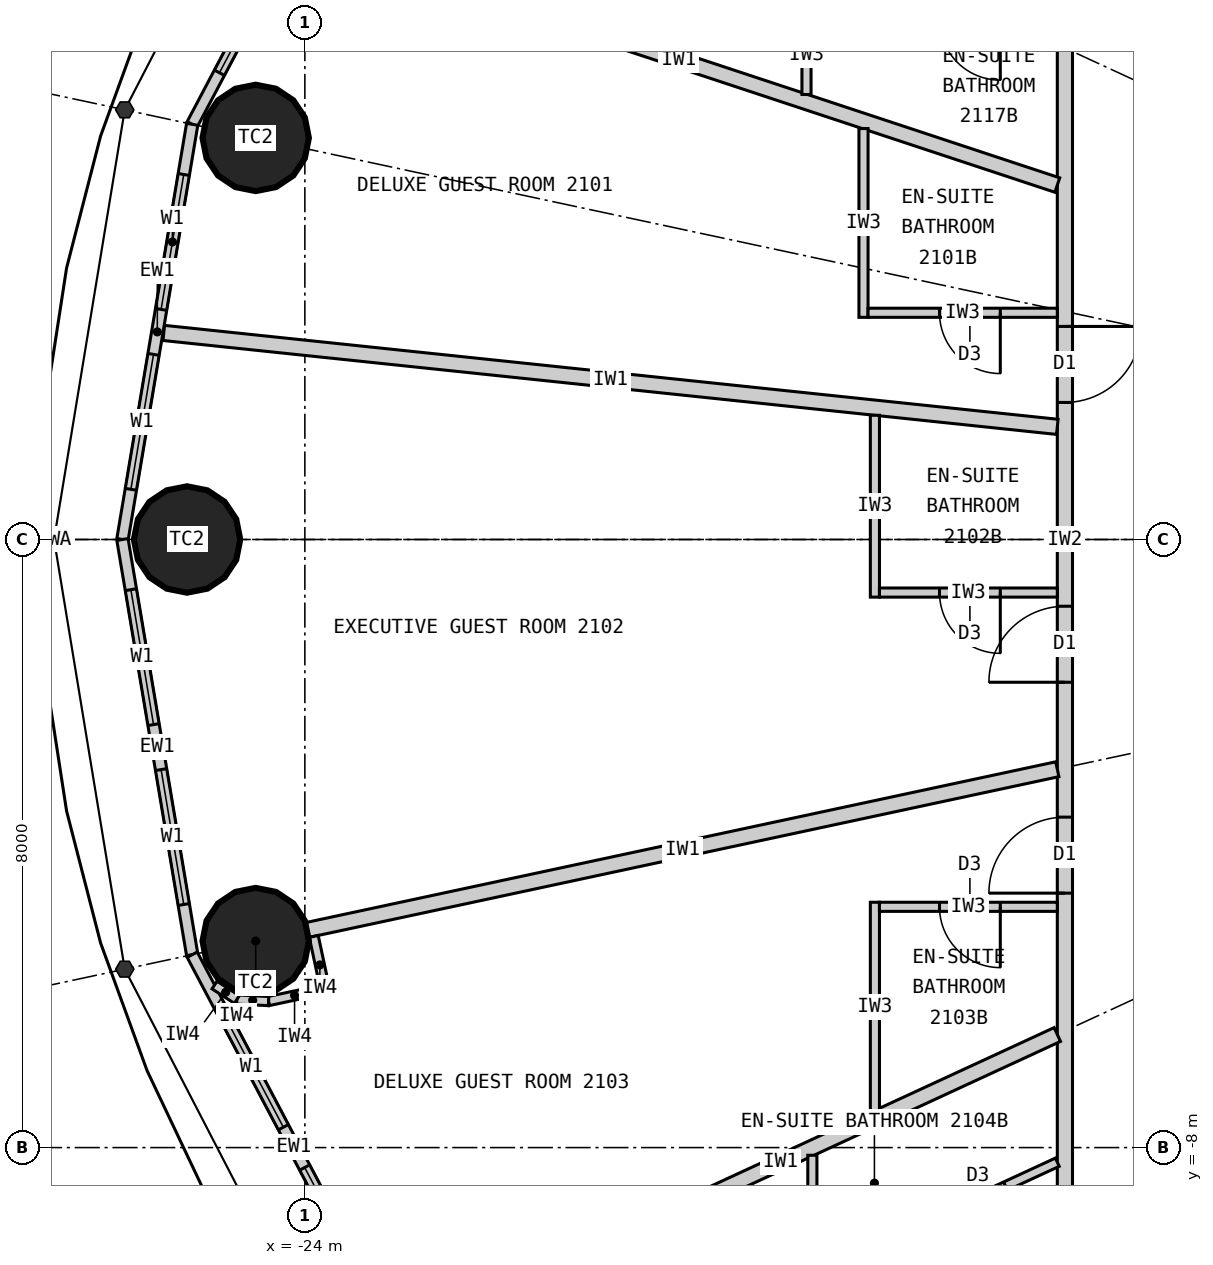
"""IFC4 building model, lengths in metres.
Left out: names, types, materials, properties, quantities, classifications, styles, units other than length and angle.
Written with IfcOpenShell. Run it as: python <this file> out.ifc"""

import sys

from ifc_helpers import new_model, si_unit, direction, frame, frame_2d, origin, origin_2d, place, context, subcontext, project, spatial, rectangle, circle, extrude, element, fill, save


model = new_model("IFC4")
c1 = context("Model", 3, precision=1e-05, world=origin(), true_north=direction((0.0, 1.0)))
c2 = subcontext(c1, "Body", "Model", "MODEL_VIEW")
j1 = project(units=[si_unit("LENGTHUNIT", "METRE"), si_unit("PLANEANGLEUNIT", "RADIAN")], contexts=[c1])
p1 = place(None, origin())
s1 = spatial("IfcSite", under=j1, at=p1, CompositionType="ELEMENT")
p2 = place(p1, origin())
s2 = spatial("IfcBuilding", under=s1, at=p2, CompositionType="ELEMENT")
p3 = place(p2, frame((0.0, 0.0, 83.7)))
s3 = spatial("IfcBuildingStorey", under=s2, at=p3, CompositionType="ELEMENT", Elevation=83.7)
for number, where, z_axis, x_axis in (
    (1, (-24.647, 5.283, 0.0), (0.0, 0.0, 1.0), (1.0, 0.0, 0.0)),
    (2, (-25.55, 0.0, 0.0), (0.0, 0.0, 1.0), (1.0, 0.0, 0.0)),
    (3, (-24.647, -5.283, 0.0), (0.0, 0.0, 1.0), (1.0, 0.0, 0.0)),
):
    element("IfcColumn", number, at=place(p3, frame(where, z_axis=z_axis, x_axis=x_axis)), inside=s3, PredefinedType="COLUMN", context=c2, shape_type="SweptSolid", body=[
        extrude(circle(Radius=0.7, at=origin_2d()), origin(), (0.0, 0.0, 1.0), 3.3),
    ])
p4 = place(p3, frame((-22.803, 10.532, 0.0), z_axis=(0.0, 0.0, 1.0), x_axis=(-0.467296867008, -0.884100468321, 0.0)))
e4 = element("IfcWall", 4, at=p4, inside=s3, PredefinedType="ELEMENTEDWALL", context=c2, shape_type="SweptSolid", body=[
    extrude(rectangle(XDim=5.734, YDim=0.15, at=frame_2d((2.867, 0.0))), origin(), (0.0, 0.0, 1.0), 3.12),
])
p5 = place(p4, frame((0.767, 0.0, 0.9)))
e5 = element("IfcOpeningElement", 5, at=p5, cuts=e4, PredefinedType="OPENING", context=c2, shape_type="SweptSolid", body=[
    extrude(rectangle(XDim=1.8, YDim=1.9, at=frame_2d((0.9, 0.95))), frame((0.0, 0.085, 0.0), z_axis=(0.0, -1.0, 0.0), x_axis=(1.0, 0.0, 0.0)), (0.0, 0.0, 1.0), 0.17),
])
p6 = place(p4, frame((3.167, 0.0, 0.9)))
e6 = element("IfcOpeningElement", 6, at=p6, cuts=e4, PredefinedType="OPENING", context=c2, shape_type="SweptSolid", body=[
    extrude(rectangle(XDim=1.8, YDim=1.9, at=frame_2d((0.9, 0.95))), frame((0.0, 0.085, 0.0), z_axis=(0.0, -1.0, 0.0), x_axis=(1.0, 0.0, 0.0)), (0.0, 0.0, 1.0), 0.17),
])
p7 = place(p3, frame((-25.482, 5.462, 0.0), z_axis=(0.0, 0.0, 1.0), x_axis=(-0.165642551694, -0.986185857264, 0.0)))
e7 = element("IfcWall", 7, at=p7, inside=s3, PredefinedType="ELEMENTEDWALL", context=c2, shape_type="SweptSolid", body=[
    extrude(rectangle(XDim=5.539, YDim=0.15, at=frame_2d((2.77, 0.0))), origin(), (0.0, 0.0, 1.0), 3.12),
])
p8 = place(p7, frame((0.669, 0.0, 0.9)))
e8 = element("IfcOpeningElement", 8, at=p8, cuts=e7, PredefinedType="OPENING", context=c2, shape_type="SweptSolid", body=[
    extrude(rectangle(XDim=1.8, YDim=1.9, at=frame_2d((0.9, 0.95))), frame((0.0, 0.085, 0.0), z_axis=(0.0, -1.0, 0.0), x_axis=(1.0, 0.0, 0.0)), (0.0, 0.0, 1.0), 0.17),
])
p9 = place(p7, frame((3.07, 0.0, 0.9)))
e9 = element("IfcOpeningElement", 9, at=p9, cuts=e7, PredefinedType="OPENING", context=c2, shape_type="SweptSolid", body=[
    extrude(rectangle(XDim=1.8, YDim=1.9, at=frame_2d((0.9, 0.95))), frame((0.0, 0.085, 0.0), z_axis=(0.0, -1.0, 0.0), x_axis=(1.0, 0.0, 0.0)), (0.0, 0.0, 1.0), 0.17),
])
p10 = place(p3, frame((-26.4, 0.0, 0.0), z_axis=(0.0, 0.0, 1.0), x_axis=(0.165642551694, -0.986185857264, 0.0)))
e10 = element("IfcWall", 10, at=p10, inside=s3, PredefinedType="ELEMENTEDWALL", context=c2, shape_type="SweptSolid", body=[
    extrude(rectangle(XDim=5.539, YDim=0.15, at=frame_2d((2.77, 0.0))), origin(), (0.0, 0.0, 1.0), 3.12),
])
p11 = place(p10, frame((0.669, 0.0, 0.9)))
e11 = element("IfcOpeningElement", 11, at=p11, cuts=e10, PredefinedType="OPENING", context=c2, shape_type="SweptSolid", body=[
    extrude(rectangle(XDim=1.8, YDim=1.9, at=frame_2d((0.9, 0.95))), frame((0.0, 0.085, 0.0), z_axis=(0.0, -1.0, 0.0), x_axis=(1.0, 0.0, 0.0)), (0.0, 0.0, 1.0), 0.17),
])
p12 = place(p10, frame((3.07, 0.0, 0.9)))
e12 = element("IfcOpeningElement", 12, at=p12, cuts=e10, PredefinedType="OPENING", context=c2, shape_type="SweptSolid", body=[
    extrude(rectangle(XDim=1.8, YDim=1.9, at=frame_2d((0.9, 0.95))), frame((0.0, 0.085, 0.0), z_axis=(0.0, -1.0, 0.0), x_axis=(1.0, 0.0, 0.0)), (0.0, 0.0, 1.0), 0.17),
])
p13 = place(p3, frame((-25.482, -5.462, 0.0), z_axis=(0.0, 0.0, 1.0), x_axis=(0.467296867008, -0.884100468321, 0.0)))
e13 = element("IfcWall", 13, at=p13, inside=s3, PredefinedType="ELEMENTEDWALL", context=c2, shape_type="SweptSolid", body=[
    extrude(rectangle(XDim=5.734, YDim=0.15, at=frame_2d((2.867, 0.0))), origin(), (0.0, 0.0, 1.0), 3.12),
])
p14 = place(p13, frame((0.767, 0.0, 0.9)))
e14 = element("IfcOpeningElement", 14, at=p14, cuts=e13, PredefinedType="OPENING", context=c2, shape_type="SweptSolid", body=[
    extrude(rectangle(XDim=1.8, YDim=1.9, at=frame_2d((0.9, 0.95))), frame((0.0, 0.085, 0.0), z_axis=(0.0, -1.0, 0.0), x_axis=(1.0, 0.0, 0.0)), (0.0, 0.0, 1.0), 0.17),
])
p15 = place(p13, frame((3.167, 0.0, 0.9)))
e15 = element("IfcOpeningElement", 15, at=p15, cuts=e13, PredefinedType="OPENING", context=c2, shape_type="SweptSolid", body=[
    extrude(rectangle(XDim=1.8, YDim=1.9, at=frame_2d((0.9, 0.95))), frame((0.0, 0.085, 0.0), z_axis=(0.0, -1.0, 0.0), x_axis=(1.0, 0.0, 0.0)), (0.0, 0.0, 1.0), 0.17),
])
p16 = place(p3, frame((-14.0, 9.9, 0.0), z_axis=(0.0, 0.0, 1.0), x_axis=(0.0, -1.0, 0.0)))
e16 = element("IfcWall", 16, at=p16, inside=s3, PredefinedType="PARTITIONING", context=c2, shape_type="SweptSolid", body=[
    extrude(rectangle(XDim=19.8, YDim=0.2, at=frame_2d((9.9, 0.0))), origin(), (0.0, 0.0, 1.0), 3.12),
])
p17 = place(p16, frame((7.097, 0.0, 0.0)))
e17 = element("IfcOpeningElement", 17, at=p17, cuts=e16, PredefinedType="OPENING", context=c2, shape_type="SweptSolid", body=[
    extrude(rectangle(XDim=1.0, YDim=2.2, at=frame_2d((0.5, 1.1))), frame((0.0, 0.11, 0.0), z_axis=(0.0, -1.0, 0.0), x_axis=(1.0, 0.0, 0.0)), (0.0, 0.0, 1.0), 0.22),
])
p18 = place(p16, frame((10.778, 0.0, 0.0)))
e18 = element("IfcOpeningElement", 18, at=p18, cuts=e16, PredefinedType="OPENING", context=c2, shape_type="SweptSolid", body=[
    extrude(rectangle(XDim=1.0, YDim=2.2, at=frame_2d((0.5, 1.1))), frame((0.0, 0.11, 0.0), z_axis=(0.0, -1.0, 0.0), x_axis=(1.0, 0.0, 0.0)), (0.0, 0.0, 1.0), 0.22),
])
p19 = place(p16, frame((13.552, 0.0, 0.0)))
e19 = element("IfcOpeningElement", 19, at=p19, cuts=e16, PredefinedType="OPENING", context=c2, shape_type="SweptSolid", body=[
    extrude(rectangle(XDim=1.0, YDim=2.2, at=frame_2d((0.5, 1.1))), frame((0.0, 0.11, 0.0), z_axis=(0.0, -1.0, 0.0), x_axis=(1.0, 0.0, 0.0)), (0.0, 0.0, 1.0), 0.22),
])
p20 = place(p16, frame((18.698, 0.0, 0.0)))
e20 = element("IfcOpeningElement", 20, at=p20, cuts=e16, PredefinedType="OPENING", context=c2, shape_type="SweptSolid", body=[
    extrude(rectangle(XDim=1.0, YDim=2.2, at=frame_2d((0.5, 1.1))), frame((0.0, 0.11, 0.0), z_axis=(0.0, -1.0, 0.0), x_axis=(1.0, 0.0, 0.0)), (0.0, 0.0, 1.0), 0.22),
])
p21 = place(p16, frame((1.877, 0.0, 0.0)))
e21 = element("IfcOpeningElement", 21, at=p21, cuts=e16, PredefinedType="OPENING", context=c2, shape_type="SweptSolid", body=[
    extrude(rectangle(XDim=1.0, YDim=2.2, at=frame_2d((0.5, 1.1))), frame((0.0, 0.11, 0.0), z_axis=(0.0, -1.0, 0.0), x_axis=(1.0, 0.0, 0.0)), (0.0, 0.0, 1.0), 0.22),
])
p22 = place(p3, frame((-14.1, 4.663, 0.0), z_axis=(0.0, 0.0, 1.0), x_axis=(-0.949432655039, 0.31397075269, 0.0)))
e22 = element("IfcWall", 22, at=p22, inside=s3, PredefinedType="PARTITIONING", context=c2, shape_type="SweptSolid", body=[
    extrude(rectangle(XDim=10.486, YDim=0.2, at=frame_2d((5.243, 0.0))), origin(), (0.0, 0.0, 1.0), 3.12),
])
p23 = place(p3, frame((-14.1, 1.482, 0.0), z_axis=(0.0, 0.0, 1.0), x_axis=(-0.994522076235, 0.104526742422, 0.0)))
e23 = element("IfcWall", 23, at=p23, inside=s3, PredefinedType="PARTITIONING", context=c2, shape_type="SweptSolid", body=[
    extrude(rectangle(XDim=11.821, YDim=0.2, at=frame_2d((5.91, 0.0))), origin(), (0.0, 0.0, 1.0), 2.32),
])
p24 = place(p3, frame((-14.1, -3.022, 0.0), z_axis=(0.0, 0.0, 1.0), x_axis=(-0.977790014929, -0.209586943072, 0.0)))
e24 = element("IfcWall", 24, at=p24, inside=s3, PredefinedType="PARTITIONING", context=c2, shape_type="SweptSolid", body=[
    extrude(rectangle(XDim=10.087, YDim=0.2, at=frame_2d((5.043, 0.0))), origin(), (0.0, 0.0, 1.0), 2.32),
])
p25 = place(p3, frame((-14.1, -6.512, 0.0), z_axis=(0.0, 0.0, 1.0), x_axis=(-0.907832871056, -0.419332181247, 0.0)))
e25 = element("IfcWall", 25, at=p25, inside=s3, PredefinedType="PARTITIONING", context=c2, shape_type="SweptSolid", body=[
    extrude(rectangle(XDim=8.023, YDim=0.2, at=frame_2d((4.011, 0.0))), origin(), (0.0, 0.0, 1.0), 2.32),
])
p26 = place(p3, frame((-16.65, 5.406, 0.0), z_axis=(0.0, 0.0, 1.0), x_axis=(0.0, -1.0, 0.0)))
e26 = element("IfcWall", 26, at=p26, inside=s3, PredefinedType="PARTITIONING", context=c2, shape_type="SweptSolid", body=[
    extrude(rectangle(XDim=2.483, YDim=0.12, at=frame_2d((1.242, 0.0))), origin(), (0.0, 0.0, 1.0), 3.12),
])
p27 = place(p3, frame((-14.1, 2.983, 0.0), z_axis=(0.0, 0.0, 1.0), x_axis=(-1.0, 0.0, 0.0)))
e27 = element("IfcWall", 27, at=p27, inside=s3, PredefinedType="PARTITIONING", context=c2, shape_type="SweptSolid", body=[
    extrude(rectangle(XDim=2.49, YDim=0.12, at=frame_2d((1.245, 0.0))), origin(), (0.0, 0.0, 1.0), 3.12),
])
p28 = place(p27, frame((0.75, 0.0, 0.0)))
e28 = element("IfcOpeningElement", 28, at=p28, cuts=e27, PredefinedType="OPENING", context=c2, shape_type="SweptSolid", body=[
    extrude(rectangle(XDim=0.8, YDim=2.1, at=frame_2d((0.4, 1.05))), frame((0.0, 0.07, 0.0), z_axis=(0.0, -1.0, 0.0), x_axis=(1.0, 0.0, 0.0)), (0.0, 0.0, 1.0), 0.14),
])
p29 = place(p3, frame((-16.5, 1.634, 0.0), z_axis=(0.0, 0.0, 1.0), x_axis=(0.0, -1.0, 0.0)))
e29 = element("IfcWall", 29, at=p29, inside=s3, PredefinedType="PARTITIONING", context=c2, shape_type="SweptSolid", body=[
    extrude(rectangle(XDim=2.392, YDim=0.12, at=frame_2d((1.196, 0.0))), origin(), (0.0, 0.0, 1.0), 3.12),
])
p30 = place(p3, frame((-14.1, -0.698, 0.0), z_axis=(0.0, 0.0, 1.0), x_axis=(-1.0, 0.0, 0.0)))
e30 = element("IfcWall", 30, at=p30, inside=s3, PredefinedType="PARTITIONING", context=c2, shape_type="SweptSolid", body=[
    extrude(rectangle(XDim=2.34, YDim=0.12, at=frame_2d((1.17, 0.0))), origin(), (0.0, 0.0, 1.0), 3.12),
])
p31 = place(p30, frame((0.75, 0.0, 0.0)))
e31 = element("IfcOpeningElement", 31, at=p31, cuts=e30, PredefinedType="OPENING", context=c2, shape_type="SweptSolid", body=[
    extrude(rectangle(XDim=0.8, YDim=2.1, at=frame_2d((0.4, 1.05))), frame((0.0, 0.07, 0.0), z_axis=(0.0, -1.0, 0.0), x_axis=(1.0, 0.0, 0.0)), (0.0, 0.0, 1.0), 0.14),
])
p32 = place(p3, frame((-16.5, -7.521, 0.0), z_axis=(0.0, 0.0, 1.0), x_axis=(0.0, 1.0, 0.0)))
e32 = element("IfcWall", 32, at=p32, inside=s3, PredefinedType="PARTITIONING", context=c2, shape_type="SweptSolid", body=[
    extrude(rectangle(XDim=2.749, YDim=0.12, at=frame_2d((1.374, 0.0))), origin(), (0.0, 0.0, 1.0), 3.12),
])
p33 = place(p3, frame((-14.1, -4.833, 0.0), z_axis=(0.0, 0.0, 1.0), x_axis=(-1.0, 0.0, 0.0)))
e33 = element("IfcWall", 33, at=p33, inside=s3, PredefinedType="PARTITIONING", context=c2, shape_type="SweptSolid", body=[
    extrude(rectangle(XDim=2.34, YDim=0.12, at=frame_2d((1.17, 0.0))), origin(), (0.0, 0.0, 1.0), 3.12),
])
p34 = place(p33, frame((0.75, 0.0, 0.0)))
e34 = element("IfcOpeningElement", 34, at=p34, cuts=e33, PredefinedType="OPENING", context=c2, shape_type="SweptSolid", body=[
    extrude(rectangle(XDim=0.8, YDim=2.1, at=frame_2d((0.4, 1.05))), frame((0.0, 0.07, 0.0), z_axis=(0.0, -1.0, 0.0), x_axis=(1.0, 0.0, 0.0)), (0.0, 0.0, 1.0), 0.14),
])
p35 = place(p3, frame((-17.323, -8.101, 0.0), z_axis=(0.0, 0.0, 1.0), x_axis=(0.0, -1.0, 0.0)))
e35 = element("IfcWall", 35, at=p35, inside=s3, PredefinedType="PARTITIONING", context=c2, shape_type="SweptSolid", body=[
    extrude(rectangle(XDim=1.64, YDim=0.12, at=frame_2d((0.82, 0.0))), origin(), (0.0, 0.0, 1.0), 3.12),
])
p36 = place(p3, frame((-14.1, -8.193, 0.0), z_axis=(0.0, 0.0, 1.0), x_axis=(-0.907836493557, -0.419324338628, 0.0)))
e36 = element("IfcWall", 36, at=p36, inside=s3, PredefinedType="PARTITIONING", context=c2, shape_type="SweptSolid", body=[
    extrude(rectangle(XDim=3.49, YDim=0.12, at=frame_2d((1.745, 0.0))), origin(), (0.0, 0.0, 1.0), 3.12),
])
p37 = place(p36, frame((0.75, 0.0, 0.0)))
e37 = element("IfcOpeningElement", 37, at=p37, cuts=e36, PredefinedType="OPENING", context=c2, shape_type="SweptSolid", body=[
    extrude(rectangle(XDim=0.8, YDim=2.1, at=frame_2d((0.4, 1.05))), frame((0.0, 0.07, 0.0), z_axis=(0.0, -1.0, 0.0), x_axis=(1.0, 0.0, 0.0)), (0.0, 0.0, 1.0), 0.14),
])
p38 = place(p3, frame((-17.4, 5.854, 0.0), z_axis=(0.0, 0.0, 1.0), x_axis=(0.0, 1.0, 0.0)))
e38 = element("IfcWall", 38, at=p38, inside=s3, PredefinedType="PARTITIONING", context=c2, shape_type="SweptSolid", body=[
    extrude(rectangle(XDim=1.049, YDim=0.12, at=frame_2d((0.524, 0.0))), origin(), (0.0, 0.0, 1.0), 3.12),
])
p39 = place(p3, frame((-23.883, -5.222, 0.0), z_axis=(0.0, 0.0, 1.0), x_axis=(0.209311842415, -0.977848941619, 0.0)))
e39 = element("IfcWall", 39, at=p39, inside=s3, PredefinedType="PARTITIONING", context=c2, shape_type="SweptSolid", body=[
    extrude(rectangle(XDim=0.768, YDim=0.12, at=frame_2d((0.384, 0.0))), origin(), (0.0, 0.0, 1.0), 3.12),
])
p40 = place(p3, frame((-23.793, -5.926, 0.0), z_axis=(0.0, 0.0, 1.0), x_axis=(-0.977792206673, -0.209576717621, 0.0)))
e40 = element("IfcWall", 40, at=p40, inside=s3, PredefinedType="PARTITIONING", context=c2, shape_type="SweptSolid", body=[
    extrude(rectangle(XDim=0.7, YDim=0.12, at=frame_2d((0.35, 0.0))), origin(), (0.0, 0.0, 1.0), 3.12),
])
p41 = place(p3, frame((-24.478, -6.073, 0.0), z_axis=(0.0, 0.0, 1.0), x_axis=(-0.998708262812, 0.05081147302, 0.0)))
e41 = element("IfcWall", 41, at=p41, inside=s3, PredefinedType="PARTITIONING", context=c2, shape_type="SweptSolid", body=[
    extrude(rectangle(XDim=0.418, YDim=0.12, at=frame_2d((0.209, 0.0))), origin(), (0.0, 0.0, 1.0), 3.12),
])
p42 = place(p3, frame((-24.895, -6.052, 0.0), z_axis=(0.0, 0.0, 1.0), x_axis=(-0.839495197275, 0.54336710772, 0.0)))
e42 = element("IfcWall", 42, at=p42, inside=s3, PredefinedType="PARTITIONING", context=c2, shape_type="SweptSolid", body=[
    extrude(rectangle(XDim=0.35, YDim=0.12, at=frame_2d((0.175, 0.0))), origin(), (0.0, 0.0, 1.0), 3.12),
])
p43 = place(p6, origin())
e43 = element("IfcWindow", 43, at=p43, inside=s3, PartitioningType="SINGLE_PANEL", PredefinedType="WINDOW", context=c2, shape_type="SweptSolid", body=[
    extrude(rectangle(XDim=1.8, YDim=1.9, at=frame_2d((0.9, 0.95))), frame((0.0, 0.03, 0.0), z_axis=(0.0, -1.0, 0.0), x_axis=(1.0, 0.0, 0.0)), (0.0, 0.0, 1.0), 0.06),
])
fill(e6, e43)
p44 = place(p8, origin())
e44 = element("IfcWindow", 44, at=p44, inside=s3, PartitioningType="SINGLE_PANEL", PredefinedType="WINDOW", context=c2, shape_type="SweptSolid", body=[
    extrude(rectangle(XDim=1.8, YDim=1.9, at=frame_2d((0.9, 0.95))), frame((0.0, 0.03, 0.0), z_axis=(0.0, -1.0, 0.0), x_axis=(1.0, 0.0, 0.0)), (0.0, 0.0, 1.0), 0.06),
])
fill(e8, e44)
p45 = place(p9, origin())
e45 = element("IfcWindow", 45, at=p45, inside=s3, PartitioningType="SINGLE_PANEL", PredefinedType="WINDOW", context=c2, shape_type="SweptSolid", body=[
    extrude(rectangle(XDim=1.8, YDim=1.9, at=frame_2d((0.9, 0.95))), frame((0.0, 0.03, 0.0), z_axis=(0.0, -1.0, 0.0), x_axis=(1.0, 0.0, 0.0)), (0.0, 0.0, 1.0), 0.06),
])
fill(e9, e45)
p46 = place(p11, origin())
e46 = element("IfcWindow", 46, at=p46, inside=s3, PartitioningType="SINGLE_PANEL", PredefinedType="WINDOW", context=c2, shape_type="SweptSolid", body=[
    extrude(rectangle(XDim=1.8, YDim=1.9, at=frame_2d((0.9, 0.95))), frame((0.0, 0.03, 0.0), z_axis=(0.0, -1.0, 0.0), x_axis=(1.0, 0.0, 0.0)), (0.0, 0.0, 1.0), 0.06),
])
fill(e11, e46)
p47 = place(p12, origin())
e47 = element("IfcWindow", 47, at=p47, inside=s3, PartitioningType="SINGLE_PANEL", PredefinedType="WINDOW", context=c2, shape_type="SweptSolid", body=[
    extrude(rectangle(XDim=1.8, YDim=1.9, at=frame_2d((0.9, 0.95))), frame((0.0, 0.03, 0.0), z_axis=(0.0, -1.0, 0.0), x_axis=(1.0, 0.0, 0.0)), (0.0, 0.0, 1.0), 0.06),
])
fill(e12, e47)
p48 = place(p14, origin())
e48 = element("IfcWindow", 48, at=p48, inside=s3, PartitioningType="SINGLE_PANEL", PredefinedType="WINDOW", context=c2, shape_type="SweptSolid", body=[
    extrude(rectangle(XDim=1.8, YDim=1.9, at=frame_2d((0.9, 0.95))), frame((0.0, 0.03, 0.0), z_axis=(0.0, -1.0, 0.0), x_axis=(1.0, 0.0, 0.0)), (0.0, 0.0, 1.0), 0.06),
])
fill(e14, e48)
p49 = place(p15, origin())
e49 = element("IfcWindow", 49, at=p49, inside=s3, PartitioningType="SINGLE_PANEL", PredefinedType="WINDOW", context=c2, shape_type="SweptSolid", body=[
    extrude(rectangle(XDim=1.8, YDim=1.9, at=frame_2d((0.9, 0.95))), frame((0.0, 0.03, 0.0), z_axis=(0.0, -1.0, 0.0), x_axis=(1.0, 0.0, 0.0)), (0.0, 0.0, 1.0), 0.06),
])
fill(e15, e49)
p50 = place(p28, origin())
e50 = element("IfcDoor", 50, at=p50, inside=s3, OperationType="SINGLE_SWING_LEFT", PredefinedType="DOOR", context=c2, shape_type="SweptSolid", body=[
    extrude(rectangle(XDim=0.8, YDim=2.1, at=frame_2d((0.4, 1.05))), frame((0.0, 0.025, 0.0), z_axis=(0.0, -1.0, 0.0), x_axis=(1.0, 0.0, 0.0)), (0.0, 0.0, 1.0), 0.05),
])
fill(e28, e50)
p51 = place(p17, origin())
e51 = element("IfcDoor", 51, at=p51, inside=s3, OperationType="SINGLE_SWING_LEFT", PredefinedType="DOOR", context=c2, shape_type="SweptSolid", body=[
    extrude(rectangle(XDim=1.0, YDim=2.2, at=frame_2d((0.5, 1.1))), frame((0.0, 0.025, 0.0), z_axis=(0.0, -1.0, 0.0), x_axis=(1.0, 0.0, 0.0)), (0.0, 0.0, 1.0), 0.05),
])
fill(e17, e51)
p52 = place(p31, origin())
e52 = element("IfcDoor", 52, at=p52, inside=s3, OperationType="SINGLE_SWING_LEFT", PredefinedType="DOOR", context=c2, shape_type="SweptSolid", body=[
    extrude(rectangle(XDim=0.8, YDim=2.1, at=frame_2d((0.4, 1.05))), frame((0.0, 0.025, 0.0), z_axis=(0.0, -1.0, 0.0), x_axis=(1.0, 0.0, 0.0)), (0.0, 0.0, 1.0), 0.05),
])
fill(e31, e52)
p53 = place(p18, origin())
e53 = element("IfcDoor", 53, at=p53, inside=s3, OperationType="SINGLE_SWING_RIGHT", PredefinedType="DOOR", context=c2, shape_type="SweptSolid", body=[
    extrude(rectangle(XDim=1.0, YDim=2.2, at=frame_2d((0.5, 1.1))), frame((0.0, 0.025, 0.0), z_axis=(0.0, -1.0, 0.0), x_axis=(1.0, 0.0, 0.0)), (0.0, 0.0, 1.0), 0.05),
])
fill(e18, e53)
p54 = place(p34, origin())
e54 = element("IfcDoor", 54, at=p54, inside=s3, OperationType="SINGLE_SWING_LEFT", PredefinedType="DOOR", context=c2, shape_type="SweptSolid", body=[
    extrude(rectangle(XDim=0.8, YDim=2.1, at=frame_2d((0.4, 1.05))), frame((0.0, 0.025, 0.0), z_axis=(0.0, -1.0, 0.0), x_axis=(1.0, 0.0, 0.0)), (0.0, 0.0, 1.0), 0.05),
])
fill(e34, e54)
p55 = place(p19, origin())
e55 = element("IfcDoor", 55, at=p55, inside=s3, OperationType="SINGLE_SWING_RIGHT", PredefinedType="DOOR", context=c2, shape_type="SweptSolid", body=[
    extrude(rectangle(XDim=1.0, YDim=2.2, at=frame_2d((0.5, 1.1))), frame((0.0, 0.025, 0.0), z_axis=(0.0, -1.0, 0.0), x_axis=(1.0, 0.0, 0.0)), (0.0, 0.0, 1.0), 0.05),
])
fill(e19, e55)
p56 = place(p37, origin())
e56 = element("IfcDoor", 56, at=p56, inside=s3, OperationType="SINGLE_SWING_LEFT", PredefinedType="DOOR", context=c2, shape_type="SweptSolid", body=[
    extrude(rectangle(XDim=0.8, YDim=2.1, at=frame_2d((0.4, 1.05))), frame((0.0, 0.025, 0.0), z_axis=(0.0, -1.0, 0.0), x_axis=(1.0, 0.0, 0.0)), (0.0, 0.0, 1.0), 0.05),
])
fill(e37, e56)
save(model, sys.argv[1])
